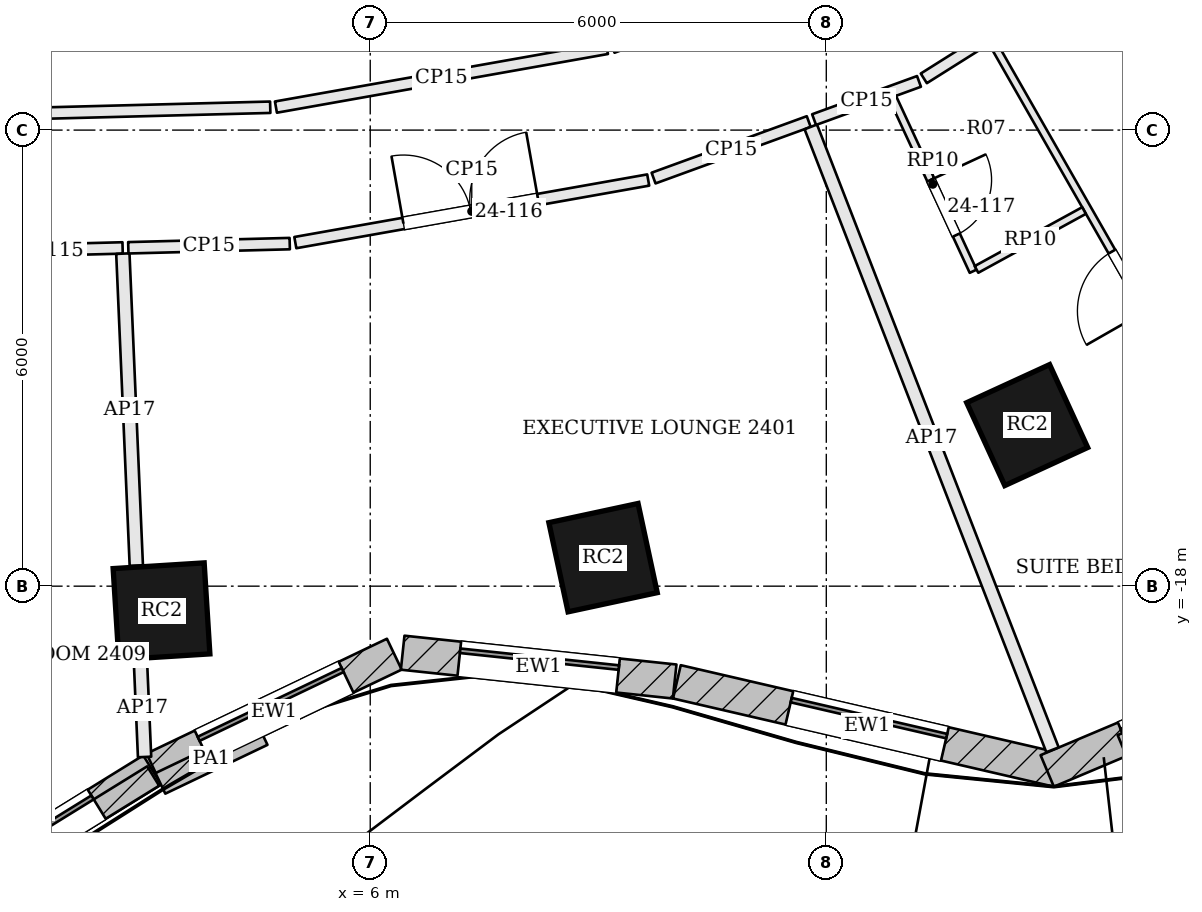
"""IFC4 building model, lengths in metres.
Left out: names, types, materials, properties, quantities, classifications, styles, units other than length and angle.
Written with IfcOpenShell. Run it as: python <this file> out.ifc"""

import sys

from ifc_helpers import new_model, si_unit, direction, frame, frame_2d, origin, origin_2d, place, context, subcontext, project, spatial, rectangle, extrude, element, fill, save


model = new_model("IFC4")
c1 = context("Model", 3, precision=1e-05, world=origin(), true_north=direction((0.0, 1.0)))
c2 = subcontext(c1, "Body", "Model", "MODEL_VIEW")
j1 = project(units=[si_unit("LENGTHUNIT", "METRE"), si_unit("PLANEANGLEUNIT", "RADIAN")], contexts=[c1])
p1 = place(None, origin())
s1 = spatial("IfcSite", under=j1, at=p1, CompositionType="ELEMENT")
p2 = place(p1, origin())
s2 = spatial("IfcBuilding", under=s1, at=p2, CompositionType="ELEMENT")
p3 = place(p2, frame((0.0, 0.0, 103.2)))
s3 = spatial("IfcBuildingStorey", under=s2, at=p3, CompositionType="ELEMENT", Elevation=103.2)
for number, where, z_axis, x_axis in (
    (1, (3.254, -18.33, 0.0), (0.0, 0.0, 1.0), (0.998, 0.063, 0.0)),
    (2, (9.063, -17.625, 0.0), (0.0, 0.0, 1.0), (0.978, 0.21, 0.0)),
    (3, (14.643, -15.881, 0.0), (0.0, 0.0, 1.0), (0.909, 0.417, 0.0)),
):
    element("IfcColumn", number, at=place(p3, frame(where, z_axis=z_axis, x_axis=x_axis)), inside=s3, PredefinedType="COLUMN", context=c2, shape_type="SweptSolid", body=[
        extrude(rectangle(XDim=1.2, YDim=1.2, at=origin_2d()), origin(), (0.0, 0.0, 1.0), 3.6),
    ])
p4 = place(p3, frame((-0.115, -22.424, 0.0), z_axis=(0.0, 0.0, 1.0), x_axis=(0.8506970368, 0.525656305564, 0.0)))
e4 = element("IfcWall", 4, at=p4, inside=s3, PredefinedType="SOLIDWALL", context=c2, shape_type="SweptSolid", body=[
    extrude(rectangle(XDim=3.816, YDim=0.45, at=frame_2d((1.908, 0.0))), origin(), (0.0, 0.0, 1.0), 3.4),
])
p5 = place(p4, frame((0.858, 0.0, 0.9)))
e5 = element("IfcOpeningElement", 5, at=p5, cuts=e4, PredefinedType="OPENING", context=c2, shape_type="SweptSolid", body=[
    extrude(rectangle(XDim=2.1, YDim=2.0, at=frame_2d((1.05, 1.0))), frame((0.0, 0.235, 0.0), z_axis=(0.0, -1.0, 0.0), x_axis=(1.0, 0.0, 0.0)), (0.0, 0.0, 1.0), 0.47),
])
p6 = place(p3, frame((3.154, -20.406, 0.0), z_axis=(0.0, 0.0, 1.0), x_axis=(0.902333313, 0.431038968367, 0.0)))
e6 = element("IfcWall", 6, at=p6, inside=s3, PredefinedType="SOLIDWALL", context=c2, shape_type="SweptSolid", body=[
    extrude(rectangle(XDim=3.505, YDim=0.45, at=frame_2d((1.753, 0.0))), origin(), (0.0, 0.0, 1.0), 3.4),
])
p7 = place(p6, frame((0.703, 0.0, 0.9)))
e7 = element("IfcOpeningElement", 7, at=p7, cuts=e6, PredefinedType="OPENING", context=c2, shape_type="SweptSolid", body=[
    extrude(rectangle(XDim=2.1, YDim=2.0, at=frame_2d((1.05, 1.0))), frame((0.0, 0.235, 0.0), z_axis=(0.0, -1.0, 0.0), x_axis=(1.0, 0.0, 0.0)), (0.0, 0.0, 1.0), 0.47),
])
p8 = place(p3, frame((6.427, -18.875, 0.0), z_axis=(0.0, 0.0, 1.0), x_axis=(0.994433468803, -0.10536638992, 0.0)))
e8 = element("IfcWall", 8, at=p8, inside=s3, PredefinedType="SOLIDWALL", context=c2, shape_type="SweptSolid", body=[
    extrude(rectangle(XDim=3.598, YDim=0.45, at=frame_2d((1.799, 0.0))), origin(), (0.0, 0.0, 1.0), 3.4),
])
p9 = place(p8, frame((0.749, 0.0, 0.9)))
e9 = element("IfcOpeningElement", 9, at=p9, cuts=e8, PredefinedType="OPENING", context=c2, shape_type="SweptSolid", body=[
    extrude(rectangle(XDim=2.1, YDim=2.0, at=frame_2d((1.05, 1.0))), frame((0.0, 0.235, 0.0), z_axis=(0.0, -1.0, 0.0), x_axis=(1.0, 0.0, 0.0)), (0.0, 0.0, 1.0), 0.47),
])
p10 = place(p3, frame((10.034, -19.259, 0.0), z_axis=(0.0, 0.0, 1.0), x_axis=(0.974223567844, -0.225584662283, 0.0)))
e10 = element("IfcWall", 10, at=p10, inside=s3, PredefinedType="SOLIDWALL", context=c2, shape_type="SweptSolid", body=[
    extrude(rectangle(XDim=5.139, YDim=0.45, at=frame_2d((2.569, 0.0))), origin(), (0.0, 0.0, 1.0), 3.4),
])
p11 = place(p10, frame((1.519, 0.0, 0.9)))
e11 = element("IfcOpeningElement", 11, at=p11, cuts=e10, PredefinedType="OPENING", context=c2, shape_type="SweptSolid", body=[
    extrude(rectangle(XDim=2.1, YDim=2.0, at=frame_2d((1.05, 1.0))), frame((0.0, 0.235, 0.0), z_axis=(0.0, -1.0, 0.0), x_axis=(1.0, 0.0, 0.0)), (0.0, 0.0, 1.0), 0.47),
])
p12 = place(p3, frame((14.906, -20.431, 0.0), z_axis=(0.0, 0.0, 1.0), x_axis=(0.921435803521, 0.388530642279, 0.0)))
e12 = element("IfcWall", 12, at=p12, inside=s3, PredefinedType="SOLIDWALL", context=c2, shape_type="SweptSolid", body=[
    extrude(rectangle(XDim=4.309, YDim=0.45, at=frame_2d((2.154, 0.0))), origin(), (0.0, 0.0, 1.0), 3.4),
])
p13 = place(p12, frame((1.104, 0.0, 0.9)))
e13 = element("IfcOpeningElement", 13, at=p13, cuts=e12, PredefinedType="OPENING", context=c2, shape_type="SweptSolid", body=[
    extrude(rectangle(XDim=2.1, YDim=2.0, at=frame_2d((1.05, 1.0))), frame((0.0, 0.235, 0.0), z_axis=(0.0, -1.0, 0.0), x_axis=(1.0, 0.0, 0.0)), (0.0, 0.0, 1.0), 0.47),
])
p14 = place(p3, frame((-0.005, -22.444, 3.6), z_axis=(0.0, 0.0, 1.0), x_axis=(0.850710394144, 0.525634688063, 0.0)))
e14 = element("IfcWall", 14, at=p14, inside=s3, PredefinedType="PARAPET", context=c2, shape_type="SweptSolid", body=[
    extrude(rectangle(XDim=3.702, YDim=0.3, at=frame_2d((1.851, 0.0))), origin(), (0.0, 0.0, 1.0), 1.1),
])
p15 = place(p3, frame((3.239, -20.594, 3.6), z_axis=(0.0, 0.0, 1.0), x_axis=(0.902344893923, 0.431014724123, 0.0)))
e15 = element("IfcWall", 15, at=p15, inside=s3, PredefinedType="PARAPET", context=c2, shape_type="SweptSolid", body=[
    extrude(rectangle(XDim=1.49, YDim=0.3, at=frame_2d((0.745, 0.0))), origin(), (0.0, 0.0, 1.0), 1.1),
])
p16 = place(p3, frame((15.891, -20.097, 3.6), z_axis=(0.0, 0.0, 1.0), x_axis=(0.921468908678, 0.388452121038, 0.0)))
e16 = element("IfcWall", 16, at=p16, inside=s3, PredefinedType="PARAPET", context=c2, shape_type="SweptSolid", body=[
    extrude(rectangle(XDim=2.099, YDim=0.3, at=frame_2d((1.05, 0.0))), origin(), (0.0, 0.0, 1.0), 1.1),
])
p17 = place(p3, frame((-1.957, -13.672, 0.0), z_axis=(0.0, 0.0, 1.0), x_axis=(0.99966412241, 0.025916063855, 0.0)))
e17 = element("IfcWall", 17, at=p17, inside=s3, PredefinedType="PARTITIONING", context=c2, shape_type="SweptSolid", body=[
    extrude(rectangle(XDim=4.701, YDim=0.15, at=frame_2d((2.35, 0.0))), origin(), (0.0, 0.0, 1.0), 2.784),
])
p18 = place(p17, frame((2.743, 0.0, 0.0)))
e18 = element("IfcOpeningElement", 18, at=p18, cuts=e17, PredefinedType="OPENING", context=c2, shape_type="SweptSolid", body=[
    extrude(rectangle(XDim=1.0, YDim=2.1, at=frame_2d((0.5, 1.05))), frame((0.0, 0.085, 0.0), z_axis=(0.0, -1.0, 0.0), x_axis=(1.0, 0.0, 0.0)), (0.0, 0.0, 1.0), 0.17),
])
p19 = place(p3, frame((3.031, -20.247, 0.0), z_axis=(0.0, 0.0, 1.0), x_axis=(-0.043114350308, 0.999070144083, 0.0)))
e19 = element("IfcWall", 19, at=p19, inside=s3, PredefinedType="PARTITIONING", context=c2, shape_type="SweptSolid", body=[
    extrude(rectangle(XDim=1.28, YDim=0.175, at=frame_2d((0.64, 0.0))), origin(), (0.0, 0.0, 1.0), 2.784),
])
p20 = place(p3, frame((2.923, -17.729, 0.0), z_axis=(0.0, 0.0, 1.0), x_axis=(-0.043145793773, 0.999068786661, 0.0)))
e20 = element("IfcWall", 20, at=p20, inside=s3, PredefinedType="PARTITIONING", context=c2, shape_type="SweptSolid", body=[
    extrude(rectangle(XDim=4.108, YDim=0.175, at=frame_2d((2.054, 0.0))), origin(), (0.0, 0.0, 1.0), 2.784),
])
p21 = place(p3, frame((2.817, -13.548, 0.0), z_axis=(0.0, 0.0, 1.0), x_axis=(0.999665667544, 0.025856394436, 0.0)))
e21 = element("IfcWall", 21, at=p21, inside=s3, PredefinedType="PARTITIONING", context=c2, shape_type="SweptSolid", body=[
    extrude(rectangle(XDim=2.125, YDim=0.15, at=frame_2d((1.062, 0.0))), origin(), (0.0, 0.0, 1.0), 2.784),
])
p22 = place(p3, frame((5.015, -13.48, 0.0), z_axis=(0.0, 0.0, 1.0), x_axis=(0.984637772103, 0.174609443467, 0.0)))
e22 = element("IfcWall", 22, at=p22, inside=s3, PredefinedType="PARTITIONING", context=c2, shape_type="SweptSolid", body=[
    extrude(rectangle(XDim=4.715, YDim=0.15, at=frame_2d((2.357, 0.0))), origin(), (0.0, 0.0, 1.0), 2.784),
])
p23 = place(p22, frame((1.444, 0.0, 0.0)))
e23 = element("IfcOpeningElement", 23, at=p23, cuts=e22, PredefinedType="OPENING", context=c2, shape_type="SweptSolid", body=[
    extrude(rectangle(XDim=1.8, YDim=2.1, at=frame_2d((0.9, 1.05))), frame((0.0, 0.085, 0.0), z_axis=(0.0, -1.0, 0.0), x_axis=(1.0, 0.0, 0.0)), (0.0, 0.0, 1.0), 0.17),
])
p24 = place(p3, frame((9.728, -12.631, 0.0), z_axis=(0.0, 0.0, 1.0), x_axis=(0.939625968265, 0.342203214133, 0.0)))
e24 = element("IfcWall", 24, at=p24, inside=s3, PredefinedType="PARTITIONING", context=c2, shape_type="SweptSolid", body=[
    extrude(rectangle(XDim=2.172, YDim=0.15, at=frame_2d((1.086, 0.0))), origin(), (0.0, 0.0, 1.0), 2.784),
])
p25 = place(p3, frame((14.976, -20.153, 0.0), z_axis=(0.0, 0.0, 1.0), x_axis=(-0.361741189075, 0.932278559298, 0.0)))
e25 = element("IfcWall", 25, at=p25, inside=s3, PredefinedType="PARTITIONING", context=c2, shape_type="SweptSolid", body=[
    extrude(rectangle(XDim=8.791, YDim=0.175, at=frame_2d((4.395, 0.0))), origin(), (0.0, 0.0, 1.0), 2.784),
])
p26 = place(p3, frame((11.839, -11.862, 0.0), z_axis=(0.0, 0.0, 1.0), x_axis=(0.939613732968, 0.342236808099, 0.0)))
e26 = element("IfcWall", 26, at=p26, inside=s3, PredefinedType="PARTITIONING", context=c2, shape_type="SweptSolid", body=[
    extrude(rectangle(XDim=1.469, YDim=0.15, at=frame_2d((0.734, 0.0))), origin(), (0.0, 0.0, 1.0), 2.784),
])
p27 = place(p3, frame((13.283, -11.319, 0.0), z_axis=(0.0, 0.0, 1.0), x_axis=(0.846324171878, 0.532668185736, 0.0)))
e27 = element("IfcWall", 27, at=p27, inside=s3, PredefinedType="PARTITIONING", context=c2, shape_type="SweptSolid", body=[
    extrude(rectangle(XDim=3.392, YDim=0.15, at=frame_2d((1.696, 0.0))), origin(), (0.0, 0.0, 1.0), 2.784),
])
p28 = place(p27, frame((1.706, 0.0, 0.0)))
e28 = element("IfcOpeningElement", 28, at=p28, cuts=e27, PredefinedType="OPENING", context=c2, shape_type="SweptSolid", body=[
    extrude(rectangle(XDim=1.0, YDim=2.1, at=frame_2d((0.5, 1.05))), frame((0.0, 0.085, 0.0), z_axis=(0.0, -1.0, 0.0), x_axis=(1.0, 0.0, 0.0)), (0.0, 0.0, 1.0), 0.17),
])
p29 = place(p3, frame((9.115, -10.925, 0.0), z_axis=(0.0, 0.0, 1.0), x_axis=(-0.984632605417, -0.174638576352, 0.0)))
e29 = element("IfcWall", 29, at=p29, inside=s3, PredefinedType="PARTITIONING", context=c2, shape_type="SweptSolid", body=[
    extrude(rectangle(XDim=4.423, YDim=0.15, at=frame_2d((2.211, 0.0))), origin(), (0.0, 0.0, 1.0), 2.784),
])
p30 = place(p3, frame((4.684, -11.699, 0.0), z_axis=(0.0, 0.0, 1.0), x_axis=(-0.999663438204, -0.025942442425, 0.0)))
e30 = element("IfcWall", 30, at=p30, inside=s3, PredefinedType="PARTITIONING", context=c2, shape_type="SweptSolid", body=[
    extrude(rectangle(XDim=6.663, YDim=0.15, at=frame_2d((3.332, 0.0))), origin(), (0.0, 0.0, 1.0), 2.784),
])
p31 = place(p3, frame((18.622, -18.615, 0.0), z_axis=(0.0, 0.0, 1.0), x_axis=(-0.495924530613, 0.868365625723, 0.0)))
e31 = element("IfcWall", 31, at=p31, inside=s3, PredefinedType="PARTITIONING", context=c2, shape_type="SweptSolid", body=[
    extrude(rectangle(XDim=8.952, YDim=0.1, at=frame_2d((4.476, 0.0))), origin(), (0.0, 0.0, 1.0), 2.784),
])
p32 = place(p31, frame((4.877, 0.0, 0.0)))
e32 = element("IfcOpeningElement", 32, at=p32, cuts=e31, PredefinedType="OPENING", context=c2, shape_type="SweptSolid", body=[
    extrude(rectangle(XDim=0.9, YDim=2.4, at=frame_2d((0.45, 1.2))), frame((0.0, 0.06, 0.0), z_axis=(0.0, -1.0, 0.0), x_axis=(1.0, 0.0, 0.0)), (0.0, 0.0, 1.0), 0.12),
])
p33 = place(p3, frame((12.87, -11.566, 0.0), z_axis=(0.0, 0.0, 1.0), x_axis=(0.42076187936, -0.907171119953, 0.0)))
e33 = element("IfcWall", 33, at=p33, inside=s3, PredefinedType="PARTITIONING", context=c2, shape_type="SweptSolid", body=[
    extrude(rectangle(XDim=2.525, YDim=0.1, at=frame_2d((1.263, 0.0))), origin(), (0.0, 0.0, 1.0), 2.784),
])
p34 = place(p33, frame((1.2, 0.0, 0.0)))
e34 = element("IfcOpeningElement", 34, at=p34, cuts=e33, PredefinedType="OPENING", context=c2, shape_type="SweptSolid", body=[
    extrude(rectangle(XDim=0.8, YDim=2.1, at=frame_2d((0.4, 1.05))), frame((0.0, 0.06, 0.0), z_axis=(0.0, -1.0, 0.0), x_axis=(1.0, 0.0, 0.0)), (0.0, 0.0, 1.0), 0.12),
])
p35 = place(p3, frame((13.976, -13.833, 0.0), z_axis=(0.0, 0.0, 1.0), x_axis=(0.877160016476, 0.480198193975, 0.0)))
e35 = element("IfcWall", 35, at=p35, inside=s3, PredefinedType="PARTITIONING", context=c2, shape_type="SweptSolid", body=[
    extrude(rectangle(XDim=1.613, YDim=0.1, at=frame_2d((0.807, 0.0))), origin(), (0.0, 0.0, 1.0), 2.784),
])
p36 = place(p5, origin())
e36 = element("IfcWindow", 36, at=p36, inside=s3, PartitioningType="SINGLE_PANEL", PredefinedType="WINDOW", context=c2, shape_type="SweptSolid", body=[
    extrude(rectangle(XDim=2.1, YDim=2.0, at=frame_2d((1.05, 1.0))), frame((0.0, 0.135, 0.0), z_axis=(0.0, -1.0, 0.0), x_axis=(1.0, 0.0, 0.0)), (0.0, 0.0, 1.0), 0.06),
])
fill(e5, e36)
p37 = place(p7, origin())
e37 = element("IfcWindow", 37, at=p37, inside=s3, PartitioningType="SINGLE_PANEL", PredefinedType="WINDOW", context=c2, shape_type="SweptSolid", body=[
    extrude(rectangle(XDim=2.1, YDim=2.0, at=frame_2d((1.05, 1.0))), frame((0.0, 0.135, 0.0), z_axis=(0.0, -1.0, 0.0), x_axis=(1.0, 0.0, 0.0)), (0.0, 0.0, 1.0), 0.06),
])
fill(e7, e37)
p38 = place(p9, origin())
e38 = element("IfcWindow", 38, at=p38, inside=s3, PartitioningType="SINGLE_PANEL", PredefinedType="WINDOW", context=c2, shape_type="SweptSolid", body=[
    extrude(rectangle(XDim=2.1, YDim=2.0, at=frame_2d((1.05, 1.0))), frame((0.0, 0.135, 0.0), z_axis=(0.0, -1.0, 0.0), x_axis=(1.0, 0.0, 0.0)), (0.0, 0.0, 1.0), 0.06),
])
fill(e9, e38)
p39 = place(p11, origin())
e39 = element("IfcWindow", 39, at=p39, inside=s3, PartitioningType="SINGLE_PANEL", PredefinedType="WINDOW", context=c2, shape_type="SweptSolid", body=[
    extrude(rectangle(XDim=2.1, YDim=2.0, at=frame_2d((1.05, 1.0))), frame((0.0, 0.135, 0.0), z_axis=(0.0, -1.0, 0.0), x_axis=(1.0, 0.0, 0.0)), (0.0, 0.0, 1.0), 0.06),
])
fill(e11, e39)
p40 = place(p13, origin())
e40 = element("IfcWindow", 40, at=p40, inside=s3, PartitioningType="SINGLE_PANEL", PredefinedType="WINDOW", context=c2, shape_type="SweptSolid", body=[
    extrude(rectangle(XDim=2.1, YDim=2.0, at=frame_2d((1.05, 1.0))), frame((0.0, 0.135, 0.0), z_axis=(0.0, -1.0, 0.0), x_axis=(1.0, 0.0, 0.0)), (0.0, 0.0, 1.0), 0.06),
])
fill(e13, e40)
p41 = place(p23, origin())
e41 = element("IfcDoor", 41, at=p41, inside=s3, OperationType="DOUBLE_DOOR_SINGLE_SWING", PredefinedType="DOOR", context=c2, shape_type="SweptSolid", body=[
    extrude(rectangle(XDim=1.8, YDim=2.1, at=frame_2d((0.9, 1.05))), frame((0.0, 0.025, 0.0), z_axis=(0.0, -1.0, 0.0), x_axis=(1.0, 0.0, 0.0)), (0.0, 0.0, 1.0), 0.05),
])
fill(e23, e41)
p42 = place(p34, origin())
e42 = element("IfcDoor", 42, at=p42, inside=s3, OperationType="SINGLE_SWING_LEFT", PredefinedType="DOOR", context=c2, shape_type="SweptSolid", body=[
    extrude(rectangle(XDim=0.8, YDim=2.1, at=frame_2d((0.4, 1.05))), frame((0.0, 0.025, 0.0), z_axis=(0.0, -1.0, 0.0), x_axis=(1.0, 0.0, 0.0)), (0.0, 0.0, 1.0), 0.05),
])
fill(e34, e42)
p43 = place(p32, origin())
e43 = element("IfcDoor", 43, at=p43, inside=s3, OperationType="SINGLE_SWING_LEFT", PredefinedType="DOOR", context=c2, shape_type="SweptSolid", body=[
    extrude(rectangle(XDim=0.9, YDim=2.4, at=frame_2d((0.45, 1.2))), frame((0.0, 0.025, 0.0), z_axis=(0.0, -1.0, 0.0), x_axis=(1.0, 0.0, 0.0)), (0.0, 0.0, 1.0), 0.05),
])
fill(e32, e43)
save(model, sys.argv[1])
